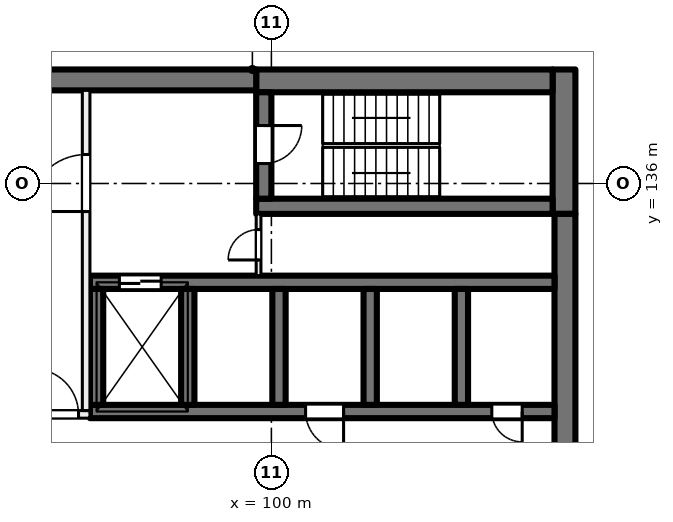
"""IFC4 building model, lengths in metres.
Left out: names, types, materials, properties, quantities, classifications, styles, units other than length and angle.
Written with IfcOpenShell. Run it as: python <this file> out.ifc"""

import sys

from ifc_helpers import new_model, si_unit, direction, frame, frame_2d, origin, place, context, subcontext, project, spatial, rectangle, extrude, element, fill, save


model = new_model("IFC4")
c1 = context("Model", 3, precision=1e-05, world=origin(), true_north=direction((0.0, 1.0)))
c2 = subcontext(c1, "Body", "Model", "MODEL_VIEW")
j1 = project(units=[si_unit("LENGTHUNIT", "METRE"), si_unit("PLANEANGLEUNIT", "RADIAN")], contexts=[c1])
p1 = place(None, origin())
s1 = spatial("IfcSite", under=j1, at=p1, CompositionType="ELEMENT")
p2 = place(p1, origin())
s2 = spatial("IfcBuilding", under=s1, at=p2, CompositionType="ELEMENT")
p3 = place(p2, frame((0.0, 0.0, 174.5)))
s3 = spatial("IfcBuildingStorey", under=s2, at=p3, CompositionType="ELEMENT", Elevation=174.5)
p4 = place(p3, frame((107.7, 139.0, 0.0), z_axis=(0.0, 0.0, 1.0), x_axis=(0.0, -1.0, 0.0)))
e1 = element("IfcWall", 1, at=p4, inside=s3, PredefinedType="SHEAR", context=c2, shape_type="SweptSolid", body=[
    extrude(rectangle(XDim=3.8, YDim=0.6, at=frame_2d((1.9, 0.0))), origin(), (0.0, 0.0, 1.0), 4.0),
])
p5 = place(p3, frame((107.725, 135.2, 0.0), z_axis=(0.0, 0.0, 1.0), x_axis=(0.0, -1.0, 0.0)))
e2 = element("IfcWall", 2, at=p5, inside=s3, PredefinedType="SHEAR", context=c2, shape_type="SweptSolid", body=[
    extrude(rectangle(XDim=14.4, YDim=0.55, at=frame_2d((7.2, 0.0))), origin(), (0.0, 0.0, 1.0), 4.0),
])
p6 = place(p3, frame((107.4, 138.7, 0.0), z_axis=(0.0, 0.0, 1.0), x_axis=(-1.0, 0.0, 0.0)))
e3 = element("IfcWall", 3, at=p6, inside=s3, PredefinedType="SHEAR", context=c2, shape_type="SweptSolid", body=[
    extrude(rectangle(XDim=7.8, YDim=0.6, at=frame_2d((3.9, 0.0))), origin(), (0.0, 0.0, 1.0), 4.0),
])
p7 = place(p3, frame((99.6, 138.725, 0.0), z_axis=(0.0, 0.0, 1.0), x_axis=(-1.0, 0.0, 0.0)))
e4 = element("IfcWall", 4, at=p7, inside=s3, PredefinedType="SHEAR", context=c2, shape_type="SweptSolid", body=[
    extrude(rectangle(XDim=8.95, YDim=0.55, at=frame_2d((4.475, 0.0))), origin(), (0.0, 0.0, 1.0), 4.0),
])
p8 = place(p3, frame((107.4, 135.4, 0.0), z_axis=(0.0, 0.0, 1.0), x_axis=(-1.0, 0.0, 0.0)))
e5 = element("IfcWall", 5, at=p8, inside=s3, PredefinedType="SHEAR", context=c2, shape_type="SweptSolid", body=[
    extrude(rectangle(XDim=7.8, YDim=0.4, at=frame_2d((3.9, 0.0))), origin(), (0.0, 0.0, 1.0), 4.0),
])
p9 = place(p3, frame((99.8, 138.4, 0.0), z_axis=(0.0, 0.0, 1.0), x_axis=(0.0, -1.0, 0.0)))
e6 = element("IfcWall", 6, at=p9, inside=s3, PredefinedType="SHEAR", context=c2, shape_type="SweptSolid", body=[
    extrude(rectangle(XDim=2.8, YDim=0.4, at=frame_2d((1.4, 0.0))), origin(), (0.0, 0.0, 1.0), 4.0),
])
p10 = place(p9, frame((0.875, 0.0, 0.0)))
e7 = element("IfcOpeningElement", 7, at=p10, cuts=e6, PredefinedType="OPENING", context=c2, shape_type="SweptSolid", body=[
    extrude(rectangle(XDim=1.0, YDim=2.1, at=frame_2d((0.5, 1.05))), frame((0.0, 0.21, 0.0), z_axis=(0.0, -1.0, 0.0), x_axis=(1.0, 0.0, 0.0)), (0.0, 0.0, 1.0), 0.42),
])
p11 = place(p3, frame((107.45, 130.0, 0.0), z_axis=(0.0, 0.0, 1.0), x_axis=(-1.0, 0.0, 0.0)))
e8 = element("IfcWall", 8, at=p11, inside=s3, PredefinedType="SHEAR", context=c2, shape_type="SweptSolid", body=[
    extrude(rectangle(XDim=12.225, YDim=0.35, at=frame_2d((6.112, 0.0))), origin(), (0.0, 0.0, 1.0), 4.0),
])
p12 = place(p11, frame((0.85, 0.0, 0.0)))
e9 = element("IfcOpeningElement", 9, at=p12, cuts=e8, PredefinedType="OPENING", context=c2, shape_type="SweptSolid", body=[
    extrude(rectangle(XDim=0.8, YDim=2.1, at=frame_2d((0.4, 1.05))), frame((0.0, 0.185, 0.0), z_axis=(0.0, -1.0, 0.0), x_axis=(1.0, 0.0, 0.0)), (0.0, 0.0, 1.0), 0.37),
])
p13 = place(p11, frame((5.55, 0.0, 0.0)))
e10 = element("IfcOpeningElement", 10, at=p13, cuts=e8, PredefinedType="OPENING", context=c2, shape_type="SweptSolid", body=[
    extrude(rectangle(XDim=1.0, YDim=2.1, at=frame_2d((0.5, 1.05))), frame((0.0, 0.185, 0.0), z_axis=(0.0, -1.0, 0.0), x_axis=(1.0, 0.0, 0.0)), (0.0, 0.0, 1.0), 0.37),
])
p14 = place(p3, frame((107.45, 133.4, 0.0), z_axis=(0.0, 0.0, 1.0), x_axis=(-1.0, 0.0, 0.0)))
e11 = element("IfcWall", 11, at=p14, inside=s3, PredefinedType="SHEAR", context=c2, shape_type="SweptSolid", body=[
    extrude(rectangle(XDim=12.225, YDim=0.35, at=frame_2d((6.112, 0.0))), origin(), (0.0, 0.0, 1.0), 4.0),
])
p15 = place(p14, frame((10.35, 0.0, 0.0)))
e12 = element("IfcOpeningElement", 12, at=p15, cuts=e11, PredefinedType="OPENING", context=c2, shape_type="SweptSolid", body=[
    extrude(rectangle(XDim=1.1, YDim=2.1, at=frame_2d((0.55, 1.05))), frame((0.0, 0.185, 0.0), z_axis=(0.0, -1.0, 0.0), x_axis=(1.0, 0.0, 0.0)), (0.0, 0.0, 1.0), 0.37),
])
for number, where, z_axis, x_axis in (
    (13, (105.0, 133.225, 0.0), (0.0, 0.0, 1.0), (0.0, -1.0, 0.0)),
    (14, (102.6, 133.225, 0.0), (0.0, 0.0, 1.0), (0.0, -1.0, 0.0)),
    (15, (100.2, 133.225, 0.0), (0.0, 0.0, 1.0), (0.0, -1.0, 0.0)),
    (16, (97.8, 133.225, 0.0), (0.0, 0.0, 1.0), (0.0, -1.0, 0.0)),
    (17, (95.4, 133.225, 0.0), (0.0, 0.0, 1.0), (0.0, -1.0, 0.0)),
):
    element("IfcWall", number, at=place(p3, frame(where, z_axis=z_axis, x_axis=x_axis)), inside=s3, PredefinedType="SHEAR", context=c2, shape_type="SweptSolid", body=[
        extrude(rectangle(XDim=3.05, YDim=0.35, at=frame_2d((1.525, 0.0))), origin(), (0.0, 0.0, 1.0), 4.0),
    ])
p16 = place(p3, frame((91.35, 129.925, 0.0), z_axis=(0.0, 0.0, 1.0), x_axis=(1.0, 0.0, 0.0)))
e18 = element("IfcWall", 18, at=p16, inside=s3, PredefinedType="PARTITIONING", context=c2, shape_type="SweptSolid", body=[
    extrude(rectangle(XDim=3.875, YDim=0.2, at=frame_2d((1.938, 0.0))), origin(), (0.0, 0.0, 1.0), 3.625),
])
p17 = place(p16, frame((2.375, 0.0, 0.0)))
e19 = element("IfcOpeningElement", 19, at=p17, cuts=e18, PredefinedType="OPENING", context=c2, shape_type="SweptSolid", body=[
    extrude(rectangle(XDim=1.2, YDim=2.1, at=frame_2d((0.6, 1.05))), frame((0.0, 0.11, 0.0), z_axis=(0.0, -1.0, 0.0), x_axis=(1.0, 0.0, 0.0)), (0.0, 0.0, 1.0), 0.22),
])
p18 = place(p3, frame((95.125, 130.025, 0.0), z_axis=(0.0, 0.0, 1.0), x_axis=(0.0, 1.0, 0.0)))
e20 = element("IfcWall", 20, at=p18, inside=s3, PredefinedType="PARTITIONING", context=c2, shape_type="SweptSolid", body=[
    extrude(rectangle(XDim=8.425, YDim=0.2, at=frame_2d((4.212, 0.0))), origin(), (0.0, 0.0, 1.0), 3.625),
])
p19 = place(p18, frame((5.238, 0.0, 0.0)))
e21 = element("IfcOpeningElement", 21, at=p19, cuts=e20, PredefinedType="OPENING", context=c2, shape_type="SweptSolid", body=[
    extrude(rectangle(XDim=1.5, YDim=2.1, at=frame_2d((0.75, 1.05))), frame((0.0, 0.11, 0.0), z_axis=(0.0, -1.0, 0.0), x_axis=(1.0, 0.0, 0.0)), (0.0, 0.0, 1.0), 0.22),
])
p20 = place(p3, frame((99.663, 133.575, 0.0), z_axis=(0.0, 0.0, 1.0), x_axis=(0.0, 1.0, 0.0)))
e22 = element("IfcWall", 22, at=p20, inside=s3, PredefinedType="PARTITIONING", context=c2, shape_type="SweptSolid", body=[
    extrude(rectangle(XDim=1.625, YDim=0.125, at=frame_2d((0.812, 0.0))), origin(), (0.0, 0.0, 1.0), 3.625),
])
p21 = place(p20, frame((0.413, 0.0, 0.0)))
e23 = element("IfcOpeningElement", 23, at=p21, cuts=e22, PredefinedType="OPENING", context=c2, shape_type="SweptSolid", body=[
    extrude(rectangle(XDim=0.8, YDim=2.1, at=frame_2d((0.4, 1.05))), frame((0.0, 0.073, 0.0), z_axis=(0.0, -1.0, 0.0), x_axis=(1.0, 0.0, 0.0)), (0.0, 0.0, 1.0), 0.145),
])
p22 = place(p12, origin())
e24 = element("IfcDoor", 24, at=p22, inside=s3, OperationType="SINGLE_SWING_LEFT", PredefinedType="DOOR", context=c2, shape_type="SweptSolid", body=[
    extrude(rectangle(XDim=0.8, YDim=2.1, at=frame_2d((0.4, 1.05))), frame((0.0, 0.025, 0.0), z_axis=(0.0, -1.0, 0.0), x_axis=(1.0, 0.0, 0.0)), (0.0, 0.0, 1.0), 0.05),
])
fill(e9, e24)
p23 = place(p13, origin())
e25 = element("IfcDoor", 25, at=p23, inside=s3, OperationType="SINGLE_SWING_RIGHT", PredefinedType="DOOR", context=c2, shape_type="SweptSolid", body=[
    extrude(rectangle(XDim=1.0, YDim=2.1, at=frame_2d((0.5, 1.05))), frame((0.0, 0.025, 0.0), z_axis=(0.0, -1.0, 0.0), x_axis=(1.0, 0.0, 0.0)), (0.0, 0.0, 1.0), 0.05),
])
fill(e10, e25)
p24 = place(p17, origin())
e26 = element("IfcDoor", 26, at=p24, inside=s3, OperationType="DOUBLE_DOOR_SINGLE_SWING", PredefinedType="DOOR", context=c2, shape_type="SweptSolid", body=[
    extrude(rectangle(XDim=1.2, YDim=2.1, at=frame_2d((0.6, 1.05))), frame((0.0, 0.025, 0.0), z_axis=(0.0, -1.0, 0.0), x_axis=(1.0, 0.0, 0.0)), (0.0, 0.0, 1.0), 0.05),
])
fill(e19, e26)
p25 = place(p19, origin())
e27 = element("IfcDoor", 27, at=p25, inside=s3, OperationType="DOUBLE_DOOR_SINGLE_SWING", PredefinedType="DOOR", context=c2, shape_type="SweptSolid", body=[
    extrude(rectangle(XDim=1.5, YDim=2.1, at=frame_2d((0.75, 1.05))), frame((0.0, 0.025, 0.0), z_axis=(0.0, -1.0, 0.0), x_axis=(1.0, 0.0, 0.0)), (0.0, 0.0, 1.0), 0.05),
])
fill(e21, e27)
p26 = place(p10, origin())
e28 = element("IfcDoor", 28, at=p26, inside=s3, OperationType="SINGLE_SWING_RIGHT", PredefinedType="DOOR", context=c2, shape_type="SweptSolid", body=[
    extrude(rectangle(XDim=1.0, YDim=2.1, at=frame_2d((0.5, 1.05))), frame((0.0, 0.025, 0.0), z_axis=(0.0, -1.0, 0.0), x_axis=(1.0, 0.0, 0.0)), (0.0, 0.0, 1.0), 0.05),
])
fill(e7, e28)
p27 = place(p21, origin())
e29 = element("IfcDoor", 29, at=p27, inside=s3, OperationType="SINGLE_SWING_LEFT", PredefinedType="DOOR", context=c2, shape_type="SweptSolid", body=[
    extrude(rectangle(XDim=0.8, YDim=2.1, at=frame_2d((0.4, 1.05))), frame((0.0, 0.025, 0.0), z_axis=(0.0, -1.0, 0.0), x_axis=(1.0, 0.0, 0.0)), (0.0, 0.0, 1.0), 0.05),
])
fill(e23, e29)
p28 = place(p15, origin())
e30 = element("IfcDoor", 30, at=p28, inside=s3, OperationType="DOUBLE_DOOR_SLIDING", PredefinedType="DOOR", context=c2, shape_type="SweptSolid", body=[
    extrude(rectangle(XDim=1.1, YDim=2.1, at=frame_2d((0.55, 1.05))), frame((0.0, 0.025, 0.0), z_axis=(0.0, -1.0, 0.0), x_axis=(1.0, 0.0, 0.0)), (0.0, 0.0, 1.0), 0.05),
])
fill(e12, e30)
save(model, sys.argv[1])
